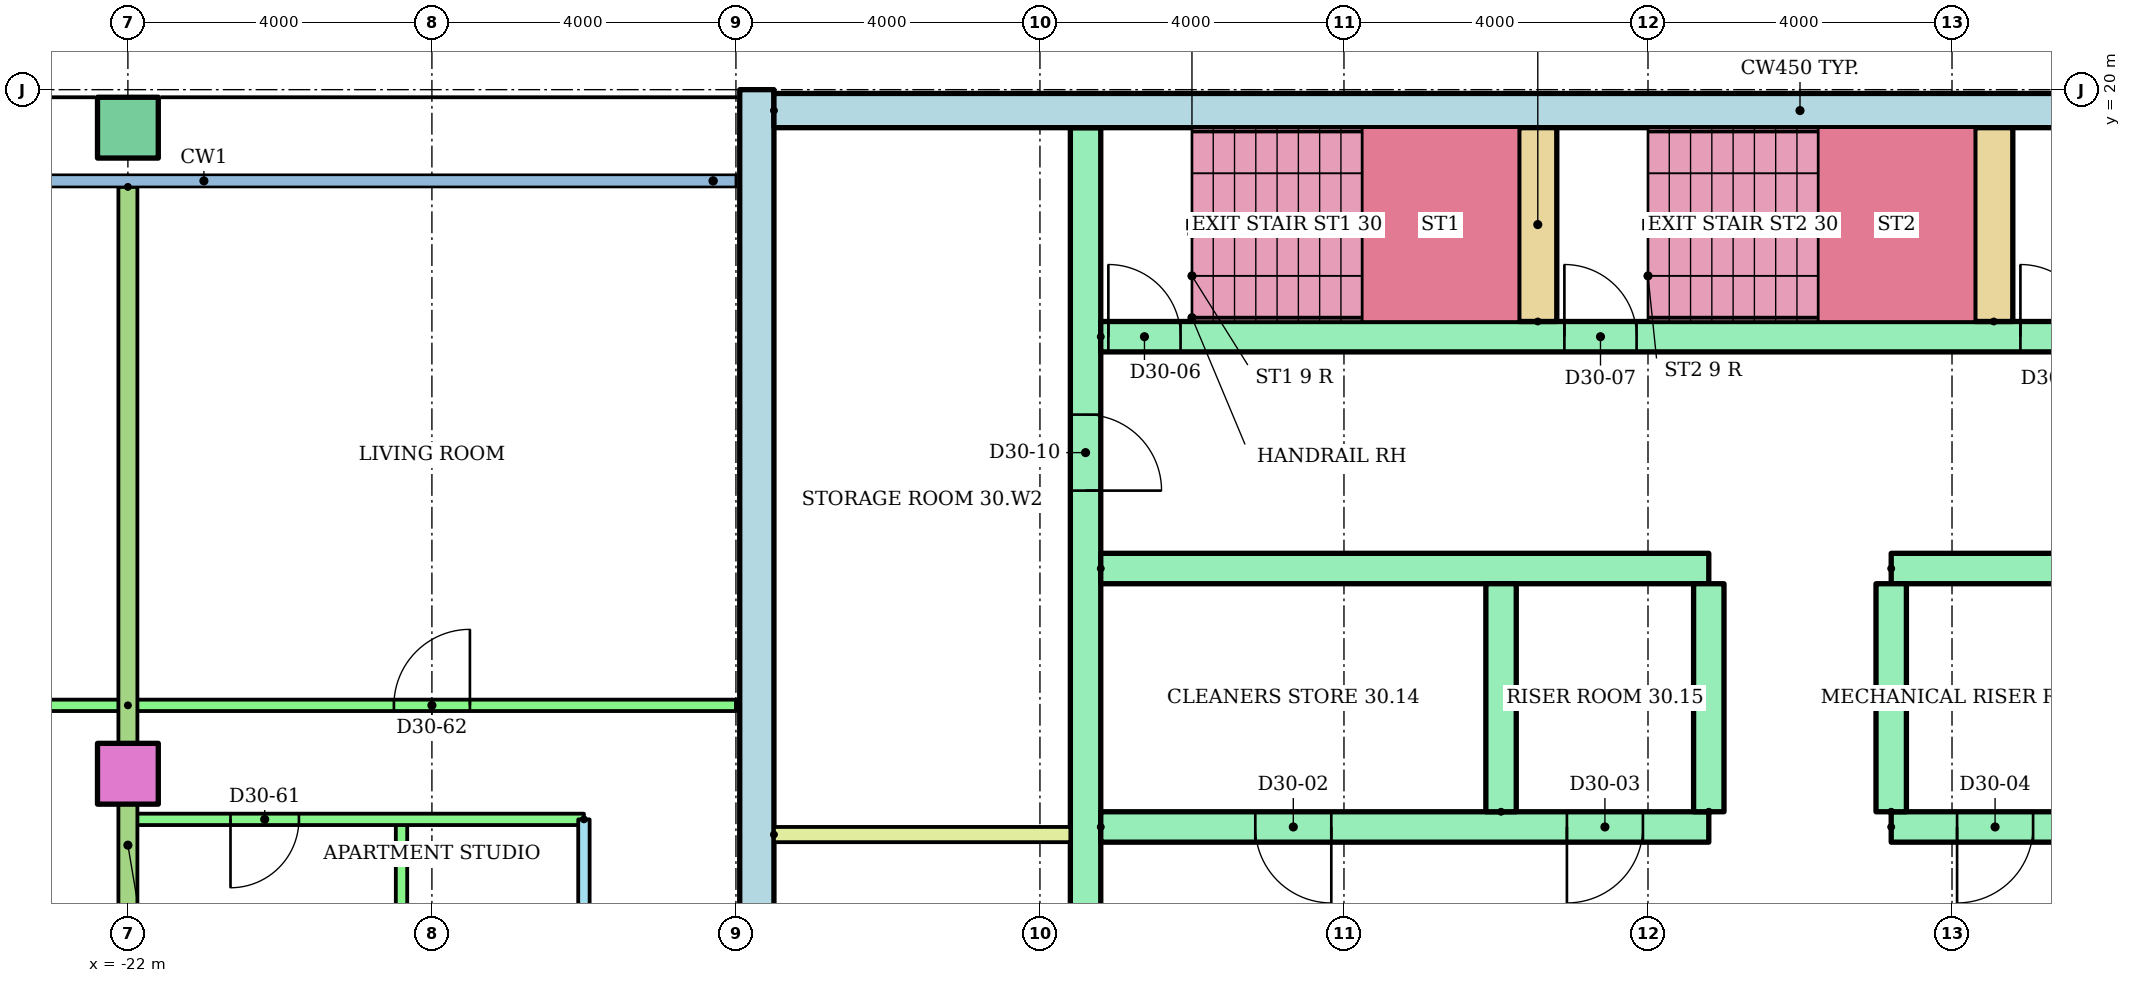
"""IFC4 building model, lengths in metres.
Left out: names, types, materials, properties, quantities, classifications, styles, units other than length and angle.
Written with IfcOpenShell. Run it as: python <this file> out.ifc"""

import sys

from ifc_helpers import new_model, si_unit, direction, frame, frame_2d, origin, origin_2d, place, context, subcontext, project, spatial, rectangle, hollow_rectangle, extrude, element, fill, save


model = new_model("IFC4")
c1 = context("Model", 3, precision=1e-05, world=origin(), true_north=direction((0.0, 1.0)))
c2 = subcontext(c1, "Body", "Model", "MODEL_VIEW")
j1 = project(units=[si_unit("LENGTHUNIT", "METRE"), si_unit("PLANEANGLEUNIT", "RADIAN")], contexts=[c1])
p1 = place(None, origin())
s1 = spatial("IfcSite", under=j1, at=p1, CompositionType="ELEMENT")
p2 = place(p1, origin())
s2 = spatial("IfcBuilding", under=s1, at=p2, CompositionType="ELEMENT")
p3 = place(p2, frame((0.0, 0.0, 119.8)))
s3 = spatial("IfcBuildingStorey", under=s2, at=p3, CompositionType="ELEMENT", Elevation=119.8)
p4 = place(p3, frame((-22.0, 11.0, 0.0)))
e1 = element("IfcColumn", 1, at=p4, inside=s3, PredefinedType="COLUMN", context=c2, shape_type="SweptSolid", body=[
    extrude(rectangle(XDim=0.8, YDim=0.8, at=origin_2d()), origin(), (0.0, 0.0, 1.0), 3.2),
])
p5 = place(p3, frame((-22.0, 19.5, 0.0)))
e2 = element("IfcColumn", 2, at=p5, inside=s3, PredefinedType="COLUMN", context=c2, shape_type="SweptSolid", body=[
    extrude(hollow_rectangle(XDim=0.8, YDim=0.8, WallThickness=0.04, at=origin_2d()), origin(), (0.0, 0.0, 1.0), 3.2),
])
p6 = place(p3, frame((-13.725, 3.0, 0.0), z_axis=(0.0, 0.0, 1.0), x_axis=(0.0, 1.0, 0.0)))
e3 = element("IfcWall", 3, at=p6, inside=s3, PredefinedType="SHEAR", context=c2, shape_type="SweptSolid", body=[
    extrude(rectangle(XDim=17.0, YDim=0.45, at=frame_2d((8.5, 0.0))), origin(), (0.0, 0.0, 1.0), 2.92),
])
p7 = place(p3, frame((-13.5, 19.725, 0.0)))
e4 = element("IfcWall", 4, at=p7, inside=s3, PredefinedType="SHEAR", context=c2, shape_type="SweptSolid", body=[
    extrude(rectangle(XDim=27.0, YDim=0.45, at=frame_2d((13.5, 0.0))), origin(), (0.0, 0.0, 1.0), 2.92),
])
p8 = place(p3, frame((-9.4, 6.8, 0.0), z_axis=(0.0, 0.0, 1.0), x_axis=(0.0, 1.0, 0.0)))
e5 = element("IfcWall", 5, at=p8, inside=s3, PredefinedType="SHEAR", context=c2, shape_type="SweptSolid", body=[
    extrude(rectangle(XDim=12.7, YDim=0.4, at=frame_2d((6.35, 0.0))), origin(), (0.0, 0.0, 1.0), 2.92),
])
p9 = place(p8, frame((1.15, 0.0, 0.0)))
e6 = element("IfcOpeningElement", 6, at=p9, cuts=e5, PredefinedType="OPENING", context=c2, shape_type="SweptSolid", body=[
    extrude(rectangle(XDim=1.0, YDim=2.1, at=frame_2d((0.5, 1.05))), frame((0.0, 0.21, 0.0), z_axis=(0.0, -1.0, 0.0), x_axis=(1.0, 0.0, 0.0)), (0.0, 0.0, 1.0), 0.42),
])
p10 = place(p8, frame((7.925, 0.0, 0.0)))
e7 = element("IfcOpeningElement", 7, at=p10, cuts=e5, PredefinedType="OPENING", context=c2, shape_type="SweptSolid", body=[
    extrude(rectangle(XDim=1.0, YDim=2.1, at=frame_2d((0.5, 1.05))), frame((0.0, 0.21, 0.0), z_axis=(0.0, -1.0, 0.0), x_axis=(1.0, 0.0, 0.0)), (0.0, 0.0, 1.0), 0.42),
])
p11 = place(p3, frame((-9.2, 10.3, 0.0)))
e8 = element("IfcWall", 8, at=p11, inside=s3, PredefinedType="SHEAR", context=c2, shape_type="SweptSolid", body=[
    extrude(rectangle(XDim=8.0, YDim=0.4, at=frame_2d((4.0, 0.0))), origin(), (0.0, 0.0, 1.0), 2.92),
])
p12 = place(p11, frame((2.033, 0.0, 0.0)))
e9 = element("IfcOpeningElement", 9, at=p12, cuts=e8, PredefinedType="OPENING", context=c2, shape_type="SweptSolid", body=[
    extrude(rectangle(XDim=1.0, YDim=2.1, at=frame_2d((0.5, 1.05))), frame((0.0, 0.21, 0.0), z_axis=(0.0, -1.0, 0.0), x_axis=(1.0, 0.0, 0.0)), (0.0, 0.0, 1.0), 0.42),
])
p13 = place(p11, frame((6.133, 0.0, 0.0)))
e10 = element("IfcOpeningElement", 10, at=p13, cuts=e8, PredefinedType="OPENING", context=c2, shape_type="SweptSolid", body=[
    extrude(rectangle(XDim=1.0, YDim=2.1, at=frame_2d((0.5, 1.05))), frame((0.0, 0.21, 0.0), z_axis=(0.0, -1.0, 0.0), x_axis=(1.0, 0.0, 0.0)), (0.0, 0.0, 1.0), 0.42),
])
p14 = place(p3, frame((-9.2, 13.7, 0.0)))
e11 = element("IfcWall", 11, at=p14, inside=s3, PredefinedType="SHEAR", context=c2, shape_type="SweptSolid", body=[
    extrude(rectangle(XDim=8.0, YDim=0.4, at=frame_2d((4.0, 0.0))), origin(), (0.0, 0.0, 1.0), 2.92),
])
p15 = place(p3, frame((1.2, 10.3, 0.0)))
e12 = element("IfcWall", 12, at=p15, inside=s3, PredefinedType="SHEAR", context=c2, shape_type="SweptSolid", body=[
    extrude(rectangle(XDim=8.0, YDim=0.4, at=frame_2d((4.0, 0.0))), origin(), (0.0, 0.0, 1.0), 2.92),
])
p16 = place(p15, frame((3.55, 0.0, 0.0)))
e13 = element("IfcOpeningElement", 13, at=p16, cuts=e12, PredefinedType="OPENING", context=c2, shape_type="SweptSolid", body=[
    extrude(rectangle(XDim=1.1, YDim=2.1, at=frame_2d((0.55, 1.05))), frame((0.0, 0.21, 0.0), z_axis=(0.0, -1.0, 0.0), x_axis=(1.0, 0.0, 0.0)), (0.0, 0.0, 1.0), 0.42),
])
p17 = place(p15, frame((6.283, 0.0, 0.0)))
e14 = element("IfcOpeningElement", 14, at=p17, cuts=e12, PredefinedType="OPENING", context=c2, shape_type="SweptSolid", body=[
    extrude(rectangle(XDim=1.1, YDim=2.1, at=frame_2d((0.55, 1.05))), frame((0.0, 0.21, 0.0), z_axis=(0.0, -1.0, 0.0), x_axis=(1.0, 0.0, 0.0)), (0.0, 0.0, 1.0), 0.42),
])
p18 = place(p15, frame((0.867, 0.0, 0.0)))
e15 = element("IfcOpeningElement", 15, at=p18, cuts=e12, PredefinedType="OPENING", context=c2, shape_type="SweptSolid", body=[
    extrude(rectangle(XDim=1.0, YDim=2.1, at=frame_2d((0.5, 1.05))), frame((0.0, 0.21, 0.0), z_axis=(0.0, -1.0, 0.0), x_axis=(1.0, 0.0, 0.0)), (0.0, 0.0, 1.0), 0.42),
])
p19 = place(p3, frame((1.2, 13.7, 0.0)))
e16 = element("IfcWall", 16, at=p19, inside=s3, PredefinedType="SHEAR", context=c2, shape_type="SweptSolid", body=[
    extrude(rectangle(XDim=8.0, YDim=0.4, at=frame_2d((4.0, 0.0))), origin(), (0.0, 0.0, 1.0), 2.92),
])
for number, where, z_axis, x_axis in (
    (17, (-3.933, 10.5, 0.0), (0.0, 0.0, 1.0), (0.0, 1.0, 0.0)),
    (18, (-1.2, 10.5, 0.0), (0.0, 0.0, 1.0), (0.0, 1.0, 0.0)),
    (19, (1.2, 10.5, 0.0), (0.0, 0.0, 1.0), (0.0, 1.0, 0.0)),
):
    element("IfcWall", number, at=place(p3, frame(where, z_axis=z_axis, x_axis=x_axis)), inside=s3, PredefinedType="SHEAR", context=c2, shape_type="SweptSolid", body=[
        extrude(rectangle(XDim=3.0, YDim=0.4, at=frame_2d((1.5, 0.0))), origin(), (0.0, 0.0, 1.0), 2.92),
    ])
p20 = place(p3, frame((-9.2, 16.75, 0.0)))
e20 = element("IfcWall", 20, at=p20, inside=s3, PredefinedType="SHEAR", context=c2, shape_type="SweptSolid", body=[
    extrude(rectangle(XDim=18.4, YDim=0.4, at=frame_2d((9.2, 0.0))), origin(), (0.0, 0.0, 1.0), 2.92),
])
p21 = place(p20, frame((0.1, 0.0, 0.0)))
e21 = element("IfcOpeningElement", 21, at=p21, cuts=e20, PredefinedType="OPENING", context=c2, shape_type="SweptSolid", body=[
    extrude(rectangle(XDim=0.95, YDim=2.1, at=frame_2d((0.475, 1.05))), frame((0.0, 0.21, 0.0), z_axis=(0.0, -1.0, 0.0), x_axis=(1.0, 0.0, 0.0)), (0.0, 0.0, 1.0), 0.42),
])
p22 = place(p20, frame((6.1, 0.0, 0.0)))
e22 = element("IfcOpeningElement", 22, at=p22, cuts=e20, PredefinedType="OPENING", context=c2, shape_type="SweptSolid", body=[
    extrude(rectangle(XDim=0.95, YDim=2.1, at=frame_2d((0.475, 1.05))), frame((0.0, 0.21, 0.0), z_axis=(0.0, -1.0, 0.0), x_axis=(1.0, 0.0, 0.0)), (0.0, 0.0, 1.0), 0.42),
])
p23 = place(p20, frame((12.1, 0.0, 0.0)))
e23 = element("IfcOpeningElement", 23, at=p23, cuts=e20, PredefinedType="OPENING", context=c2, shape_type="SweptSolid", body=[
    extrude(rectangle(XDim=0.95, YDim=2.1, at=frame_2d((0.475, 1.05))), frame((0.0, 0.21, 0.0), z_axis=(0.0, -1.0, 0.0), x_axis=(1.0, 0.0, 0.0)), (0.0, 0.0, 1.0), 0.42),
])
for number, where, z_axis, x_axis in (
    (24, (-3.45, 16.95, 0.0), (0.0, 0.0, 1.0), (0.0, 1.0, 0.0)),
    (25, (2.55, 16.95, 0.0), (0.0, 0.0, 1.0), (0.0, 1.0, 0.0)),
):
    element("IfcWall", number, at=place(p3, frame(where, z_axis=z_axis, x_axis=x_axis)), inside=s3, PredefinedType="SHEAR", context=c2, shape_type="SweptSolid", body=[
        extrude(rectangle(XDim=2.55, YDim=0.5, at=frame_2d((1.275, 0.0))), origin(), (0.0, 0.0, 1.0), 2.92),
    ])
p24 = place(p3, frame((-13.5, 10.2, 0.0)))
e26 = element("IfcWall", 26, at=p24, inside=s3, PredefinedType="PARTITIONING", context=c2, shape_type="SweptSolid", body=[
    extrude(rectangle(XDim=3.9, YDim=0.2, at=frame_2d((1.95, 0.0))), origin(), (0.0, 0.0, 1.0), 2.92),
])
p25 = place(p3, frame((-32.72, 11.9, 0.0)))
e27 = element("IfcWall", 27, at=p25, inside=s3, PredefinedType="PARTITIONING", context=c2, shape_type="SweptSolid", body=[
    extrude(rectangle(XDim=10.72, YDim=0.15, at=frame_2d((5.36, 0.0))), origin(), (0.0, 0.0, 1.0), 2.4),
])
p26 = place(p25, frame((1.102, 0.0, 0.0)))
e28 = element("IfcOpeningElement", 28, at=p26, cuts=e27, PredefinedType="OPENING", context=c2, shape_type="SweptSolid", body=[
    extrude(rectangle(XDim=1.0, YDim=2.1, at=frame_2d((0.5, 1.05))), frame((0.0, 0.085, 0.0), z_axis=(0.0, -1.0, 0.0), x_axis=(1.0, 0.0, 0.0)), (0.0, 0.0, 1.0), 0.17),
])
p27 = place(p25, frame((7.22, 0.0, 0.0)))
e29 = element("IfcOpeningElement", 29, at=p27, cuts=e27, PredefinedType="OPENING", context=c2, shape_type="SweptSolid", body=[
    extrude(rectangle(XDim=1.0, YDim=2.1, at=frame_2d((0.5, 1.05))), frame((0.0, 0.085, 0.0), z_axis=(0.0, -1.0, 0.0), x_axis=(1.0, 0.0, 0.0)), (0.0, 0.0, 1.0), 0.17),
])
p28 = place(p3, frame((-16.0, 1.4, 0.0), z_axis=(0.0, 0.0, 1.0), x_axis=(0.0, 1.0, 0.0)))
e30 = element("IfcWall", 30, at=p28, inside=s3, PredefinedType="PARTITIONING", context=c2, shape_type="SweptSolid", body=[
    extrude(rectangle(XDim=9.0, YDim=0.15, at=frame_2d((4.5, 0.0))), origin(), (0.0, 0.0, 1.0), 2.4),
])
p29 = place(p28, frame((2.05, 0.0, 0.0)))
e31 = element("IfcOpeningElement", 31, at=p29, cuts=e30, PredefinedType="OPENING", context=c2, shape_type="SweptSolid", body=[
    extrude(rectangle(XDim=0.9, YDim=2.1, at=frame_2d((0.45, 1.05))), frame((0.0, 0.085, 0.0), z_axis=(0.0, -1.0, 0.0), x_axis=(1.0, 0.0, 0.0)), (0.0, 0.0, 1.0), 0.17),
])
p30 = place(p28, frame((6.6, 0.0, 0.0)))
e32 = element("IfcOpeningElement", 32, at=p30, cuts=e30, PredefinedType="OPENING", context=c2, shape_type="SweptSolid", body=[
    extrude(rectangle(XDim=0.8, YDim=2.1, at=frame_2d((0.4, 1.05))), frame((0.0, 0.085, 0.0), z_axis=(0.0, -1.0, 0.0), x_axis=(1.0, 0.0, 0.0)), (0.0, 0.0, 1.0), 0.17),
])
p31 = place(p3, frame((-18.4, 1.4, 0.0), z_axis=(0.0, 0.0, 1.0), x_axis=(0.0, 1.0, 0.0)))
e33 = element("IfcWall", 33, at=p31, inside=s3, PredefinedType="PARTITIONING", context=c2, shape_type="SweptSolid", body=[
    extrude(rectangle(XDim=9.0, YDim=0.15, at=frame_2d((4.5, 0.0))), origin(), (0.0, 0.0, 1.0), 2.4),
])
p32 = place(p3, frame((-16.0, 10.4, 0.0), z_axis=(0.0, 0.0, 1.0), x_axis=(-1.0, 0.0, 0.0)))
e34 = element("IfcWall", 34, at=p32, inside=s3, PredefinedType="PARTITIONING", context=c2, shape_type="SweptSolid", body=[
    extrude(rectangle(XDim=6.0, YDim=0.15, at=frame_2d((3.0, 0.0))), origin(), (0.0, 0.0, 1.0), 2.4),
])
p33 = place(p32, frame((3.75, 0.0, 0.0)))
e35 = element("IfcOpeningElement", 35, at=p33, cuts=e34, PredefinedType="OPENING", context=c2, shape_type="SweptSolid", body=[
    extrude(rectangle(XDim=0.9, YDim=2.1, at=frame_2d((0.45, 1.05))), frame((0.0, 0.085, 0.0), z_axis=(0.0, -1.0, 0.0), x_axis=(1.0, 0.0, 0.0)), (0.0, 0.0, 1.0), 0.17),
])
p34 = place(p3, frame((-22.0, 11.9, 0.0)))
e36 = element("IfcWall", 36, at=p34, inside=s3, PredefinedType="PARTITIONING", context=c2, shape_type="SweptSolid", body=[
    extrude(rectangle(XDim=8.0, YDim=0.15, at=frame_2d((4.0, 0.0))), origin(), (0.0, 0.0, 1.0), 2.4),
])
p35 = place(p34, frame((3.5, 0.0, 0.0)))
e37 = element("IfcOpeningElement", 37, at=p35, cuts=e36, PredefinedType="OPENING", context=c2, shape_type="SweptSolid", body=[
    extrude(rectangle(XDim=1.0, YDim=2.1, at=frame_2d((0.5, 1.05))), frame((0.0, 0.085, 0.0), z_axis=(0.0, -1.0, 0.0), x_axis=(1.0, 0.0, 0.0)), (0.0, 0.0, 1.0), 0.17),
])
p36 = place(p3, frame((-22.0, 18.721, 0.0), z_axis=(0.0, 0.0, 1.0), x_axis=(0.0, -1.0, 0.0)))
e38 = element("IfcWall", 38, at=p36, inside=s3, PredefinedType="PARTITIONING", context=c2, shape_type="SweptSolid", body=[
    extrude(rectangle(XDim=17.321, YDim=0.25, at=frame_2d((8.661, 0.0))), origin(), (0.0, 0.0, 1.0), 2.4),
])
p37 = place(p12, frame((1.0, 0.0, 0.0), z_axis=(0.0, 0.0, 1.0), x_axis=(-1.0, 0.0, 0.0)))
e39 = element("IfcDoor", 39, at=p37, inside=s3, OperationType="SINGLE_SWING_RIGHT", PredefinedType="DOOR", context=c2, shape_type="SweptSolid", body=[
    extrude(rectangle(XDim=1.0, YDim=2.1, at=frame_2d((0.5, 1.05))), frame((0.0, 0.025, 0.0), z_axis=(0.0, -1.0, 0.0), x_axis=(1.0, 0.0, 0.0)), (0.0, 0.0, 1.0), 0.05),
])
fill(e9, e39)
p38 = place(p13, frame((1.0, 0.0, 0.0), z_axis=(0.0, 0.0, 1.0), x_axis=(-1.0, 0.0, 0.0)))
e40 = element("IfcDoor", 40, at=p38, inside=s3, OperationType="SINGLE_SWING_LEFT", PredefinedType="DOOR", context=c2, shape_type="SweptSolid", body=[
    extrude(rectangle(XDim=1.0, YDim=2.1, at=frame_2d((0.5, 1.05))), frame((0.0, 0.025, 0.0), z_axis=(0.0, -1.0, 0.0), x_axis=(1.0, 0.0, 0.0)), (0.0, 0.0, 1.0), 0.05),
])
fill(e10, e40)
p39 = place(p18, frame((1.0, 0.0, 0.0), z_axis=(0.0, 0.0, 1.0), x_axis=(-1.0, 0.0, 0.0)))
e41 = element("IfcDoor", 41, at=p39, inside=s3, OperationType="SINGLE_SWING_LEFT", PredefinedType="DOOR", context=c2, shape_type="SweptSolid", body=[
    extrude(rectangle(XDim=1.0, YDim=2.1, at=frame_2d((0.5, 1.05))), frame((0.0, 0.025, 0.0), z_axis=(0.0, -1.0, 0.0), x_axis=(1.0, 0.0, 0.0)), (0.0, 0.0, 1.0), 0.05),
])
fill(e15, e41)
p40 = place(p21, origin())
e42 = element("IfcDoor", 42, at=p40, inside=s3, OperationType="SINGLE_SWING_LEFT", PredefinedType="DOOR", context=c2, shape_type="SweptSolid", body=[
    extrude(rectangle(XDim=0.95, YDim=2.1, at=frame_2d((0.475, 1.05))), frame((0.0, 0.025, 0.0), z_axis=(0.0, -1.0, 0.0), x_axis=(1.0, 0.0, 0.0)), (0.0, 0.0, 1.0), 0.05),
])
fill(e21, e42)
p41 = place(p22, origin())
e43 = element("IfcDoor", 43, at=p41, inside=s3, OperationType="SINGLE_SWING_LEFT", PredefinedType="DOOR", context=c2, shape_type="SweptSolid", body=[
    extrude(rectangle(XDim=0.95, YDim=2.1, at=frame_2d((0.475, 1.05))), frame((0.0, 0.025, 0.0), z_axis=(0.0, -1.0, 0.0), x_axis=(1.0, 0.0, 0.0)), (0.0, 0.0, 1.0), 0.05),
])
fill(e22, e43)
p42 = place(p23, origin())
e44 = element("IfcDoor", 44, at=p42, inside=s3, OperationType="SINGLE_SWING_LEFT", PredefinedType="DOOR", context=c2, shape_type="SweptSolid", body=[
    extrude(rectangle(XDim=0.95, YDim=2.1, at=frame_2d((0.475, 1.05))), frame((0.0, 0.025, 0.0), z_axis=(0.0, -1.0, 0.0), x_axis=(1.0, 0.0, 0.0)), (0.0, 0.0, 1.0), 0.05),
])
fill(e23, e44)
p43 = place(p10, frame((1.0, 0.0, 0.0), z_axis=(0.0, 0.0, 1.0), x_axis=(-1.0, 0.0, 0.0)))
e45 = element("IfcDoor", 45, at=p43, inside=s3, OperationType="SINGLE_SWING_LEFT", PredefinedType="DOOR", context=c2, shape_type="SweptSolid", body=[
    extrude(rectangle(XDim=1.0, YDim=2.1, at=frame_2d((0.5, 1.05))), frame((0.0, 0.025, 0.0), z_axis=(0.0, -1.0, 0.0), x_axis=(1.0, 0.0, 0.0)), (0.0, 0.0, 1.0), 0.05),
])
fill(e7, e45)
p44 = place(p33, origin())
e46 = element("IfcDoor", 46, at=p44, inside=s3, OperationType="SINGLE_SWING_RIGHT", PredefinedType="DOOR", context=c2, shape_type="SweptSolid", body=[
    extrude(rectangle(XDim=0.9, YDim=2.1, at=frame_2d((0.45, 1.05))), frame((0.0, 0.025, 0.0), z_axis=(0.0, -1.0, 0.0), x_axis=(1.0, 0.0, 0.0)), (0.0, 0.0, 1.0), 0.05),
])
fill(e35, e46)
p45 = place(p35, origin())
e47 = element("IfcDoor", 47, at=p45, inside=s3, OperationType="SINGLE_SWING_RIGHT", PredefinedType="DOOR", context=c2, shape_type="SweptSolid", body=[
    extrude(rectangle(XDim=1.0, YDim=2.1, at=frame_2d((0.5, 1.05))), frame((0.0, 0.025, 0.0), z_axis=(0.0, -1.0, 0.0), x_axis=(1.0, 0.0, 0.0)), (0.0, 0.0, 1.0), 0.05),
])
fill(e37, e47)
save(model, sys.argv[1])
